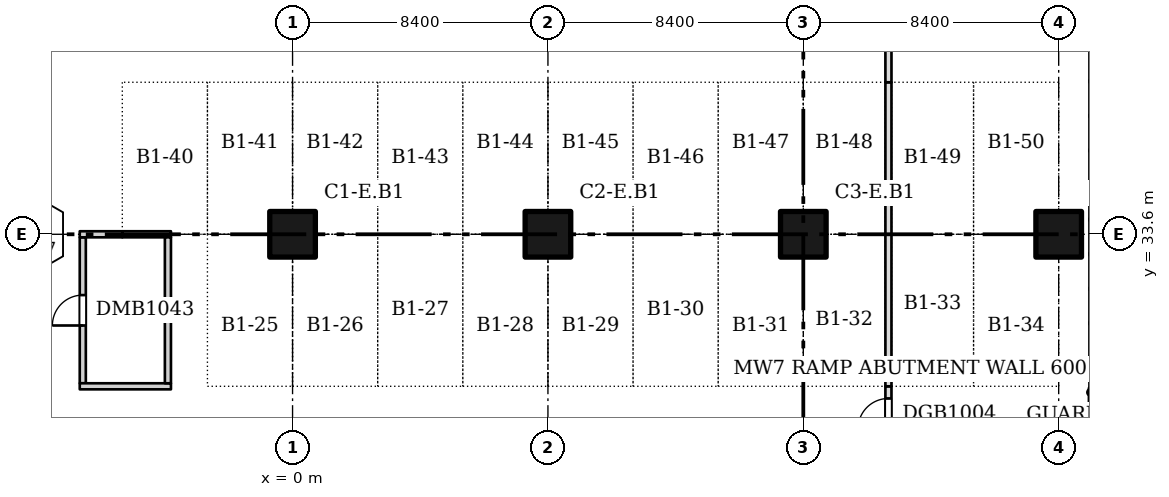
"""IFC4 building model, lengths in metres.
Left out: names, types, materials, properties, quantities, classifications, styles, units other than length and angle.
Written with IfcOpenShell. Run it as: python <this file> out.ifc"""

import sys

from ifc_helpers import new_model, si_unit, direction, frame, frame_2d, origin, origin_2d, place, context, subcontext, project, spatial, rectangle, extrude, element, fill, save


model = new_model("IFC4")
c1 = context("Model", 3, precision=1e-05, world=origin(), true_north=direction((0.0, 1.0)))
c2 = subcontext(c1, "Body", "Model", "MODEL_VIEW")
j1 = project(units=[si_unit("LENGTHUNIT", "METRE"), si_unit("PLANEANGLEUNIT", "RADIAN")], contexts=[c1])
p1 = place(None, origin())
s1 = spatial("IfcSite", under=j1, at=p1, CompositionType="ELEMENT")
p2 = place(p1, origin())
s2 = spatial("IfcBuilding", under=s1, at=p2, CompositionType="ELEMENT")
p3 = place(p2, frame((0.0, 0.0, -4.0)))
s3 = spatial("IfcBuildingStorey", under=s2, at=p3, CompositionType="ELEMENT", Elevation=-4.0)
for number, where, z_axis, x_axis in (
    (1, (0.0, 33.6, 0.0), (0.0, 0.0, 1.0), (1.0, 0.0, 0.0)),
    (2, (8.4, 33.6, 0.0), (0.0, 0.0, 1.0), (1.0, 0.0, 0.0)),
    (3, (16.8, 33.6, 0.0), (0.0, 0.0, 1.0), (1.0, 0.0, 0.0)),
    (4, (25.2, 33.6, 0.0), (0.0, 0.0, 1.0), (1.0, 0.0, 0.0)),
):
    element("IfcColumn", number, at=place(p3, frame(where, z_axis=z_axis, x_axis=x_axis)), inside=s3, PredefinedType="COLUMN", context=c2, shape_type="SweptSolid", body=[
        extrude(rectangle(XDim=1.5, YDim=1.5, at=origin_2d()), origin(), (0.0, 0.0, 1.0), 3.6),
    ])
p4 = place(p3, frame((-6.9, 28.7, 0.0), z_axis=(0.0, 0.0, 1.0), x_axis=(0.0, 1.0, 0.0)))
e5 = element("IfcWall", 5, at=p4, inside=s3, PredefinedType="PARTITIONING", context=c2, shape_type="SweptSolid", body=[
    extrude(rectangle(XDim=4.8, YDim=0.2, at=frame_2d((2.4, 0.0))), origin(), (0.0, 0.0, 1.0), 3.6),
])
p5 = place(p4, frame((1.9, 0.0, 0.0)))
e6 = element("IfcOpeningElement", 6, at=p5, cuts=e5, PredefinedType="OPENING", context=c2, shape_type="SweptSolid", body=[
    extrude(rectangle(XDim=1.0, YDim=2.1, at=frame_2d((0.5, 1.05))), frame((0.0, 0.11, 0.0), z_axis=(0.0, -1.0, 0.0), x_axis=(1.0, 0.0, 0.0)), (0.0, 0.0, 1.0), 0.22),
])
p6 = place(p3, frame((-7.0, 28.6, 0.0), z_axis=(0.0, 0.0, 1.0), x_axis=(1.0, 0.0, 0.0)))
e7 = element("IfcWall", 7, at=p6, inside=s3, PredefinedType="PARTITIONING", context=c2, shape_type="SweptSolid", body=[
    extrude(rectangle(XDim=3.0, YDim=0.2, at=frame_2d((1.5, 0.0))), origin(), (0.0, 0.0, 1.0), 3.6),
])
p7 = place(p3, frame((-7.0, 33.6, 0.0), z_axis=(0.0, 0.0, 1.0), x_axis=(1.0, 0.0, 0.0)))
e8 = element("IfcWall", 8, at=p7, inside=s3, PredefinedType="PARTITIONING", context=c2, shape_type="SweptSolid", body=[
    extrude(rectangle(XDim=1.4, YDim=0.2, at=frame_2d((0.7, 0.0))), origin(), (0.0, 0.0, 1.0), 3.6),
])
p8 = place(p3, frame((-5.6, 33.6, 0.0), z_axis=(0.0, 0.0, 1.0), x_axis=(1.0, 0.0, 0.0)))
e9 = element("IfcWall", 9, at=p8, inside=s3, PredefinedType="PARTITIONING", context=c2, shape_type="SweptSolid", body=[
    extrude(rectangle(XDim=1.6, YDim=0.2, at=frame_2d((0.8, 0.0))), origin(), (0.0, 0.0, 1.0), 3.6),
])
p9 = place(p3, frame((-4.1, 28.7, 0.0), z_axis=(0.0, 0.0, 1.0), x_axis=(0.0, 1.0, 0.0)))
e10 = element("IfcWall", 10, at=p9, inside=s3, PredefinedType="PARTITIONING", context=c2, shape_type="SweptSolid", body=[
    extrude(rectangle(XDim=4.8, YDim=0.2, at=frame_2d((2.4, 0.0))), origin(), (0.0, 0.0, 1.0), 3.6),
])
p10 = place(p3, frame((19.6, 21.8, 0.0), z_axis=(0.0, 0.0, 1.0), x_axis=(0.0, 1.0, 0.0)))
e11 = element("IfcWall", 11, at=p10, inside=s3, PredefinedType="PARTITIONING", context=c2, shape_type="SweptSolid", body=[
    extrude(rectangle(XDim=6.8, YDim=0.2, at=frame_2d((3.4, 0.0))), origin(), (0.0, 0.0, 1.0), 3.6),
])
p11 = place(p10, frame((0.3, 0.0, 0.0)))
e12 = element("IfcOpeningElement", 12, at=p11, cuts=e11, PredefinedType="OPENING", context=c2, shape_type="SweptSolid", body=[
    extrude(rectangle(XDim=4.8, YDim=2.4, at=frame_2d((2.4, 1.2))), frame((0.0, 0.11, 0.0), z_axis=(0.0, -1.0, 0.0), x_axis=(1.0, 0.0, 0.0)), (0.0, 0.0, 1.0), 0.22),
])
p12 = place(p10, frame((5.4, 0.0, 0.0)))
e13 = element("IfcOpeningElement", 13, at=p12, cuts=e11, PredefinedType="OPENING", context=c2, shape_type="SweptSolid", body=[
    extrude(rectangle(XDim=1.0, YDim=2.1, at=frame_2d((0.5, 1.05))), frame((0.0, 0.11, 0.0), z_axis=(0.0, -1.0, 0.0), x_axis=(1.0, 0.0, 0.0)), (0.0, 0.0, 1.0), 0.22),
])
p13 = place(p3, frame((19.6, 28.6, 0.0), z_axis=(0.0, 0.0, 1.0), x_axis=(0.0, 1.0, 0.0)))
e14 = element("IfcWall", 14, at=p13, inside=s3, PredefinedType="PARTITIONING", context=c2, shape_type="SweptSolid", body=[
    extrude(rectangle(XDim=10.0, YDim=0.2, at=frame_2d((5.0, 0.0))), origin(), (0.0, 0.0, 1.0), 3.6),
])
p14 = place(p3, frame((19.6, 38.6, 0.0), z_axis=(0.0, 0.0, 1.0), x_axis=(0.0, 1.0, 0.0)))
e15 = element("IfcWall", 15, at=p14, inside=s3, PredefinedType="PARTITIONING", context=c2, shape_type="SweptSolid", body=[
    extrude(rectangle(XDim=3.4, YDim=0.2, at=frame_2d((1.7, 0.0))), origin(), (0.0, 0.0, 1.0), 3.6),
])
p15 = place(p5, origin())
e16 = element("IfcDoor", 16, at=p15, inside=s3, OperationType="SINGLE_SWING_LEFT", PredefinedType="DOOR", context=c2, shape_type="SweptSolid", body=[
    extrude(rectangle(XDim=1.0, YDim=2.1, at=frame_2d((0.5, 1.05))), frame((0.0, 0.025, 0.0), z_axis=(0.0, -1.0, 0.0), x_axis=(1.0, 0.0, 0.0)), (0.0, 0.0, 1.0), 0.05),
])
fill(e6, e16)
p16 = place(p12, origin())
e17 = element("IfcDoor", 17, at=p16, inside=s3, OperationType="SINGLE_SWING_LEFT", PredefinedType="DOOR", context=c2, shape_type="SweptSolid", body=[
    extrude(rectangle(XDim=1.0, YDim=2.1, at=frame_2d((0.5, 1.05))), frame((0.0, 0.025, 0.0), z_axis=(0.0, -1.0, 0.0), x_axis=(1.0, 0.0, 0.0)), (0.0, 0.0, 1.0), 0.05),
])
fill(e13, e17)
save(model, sys.argv[1])
